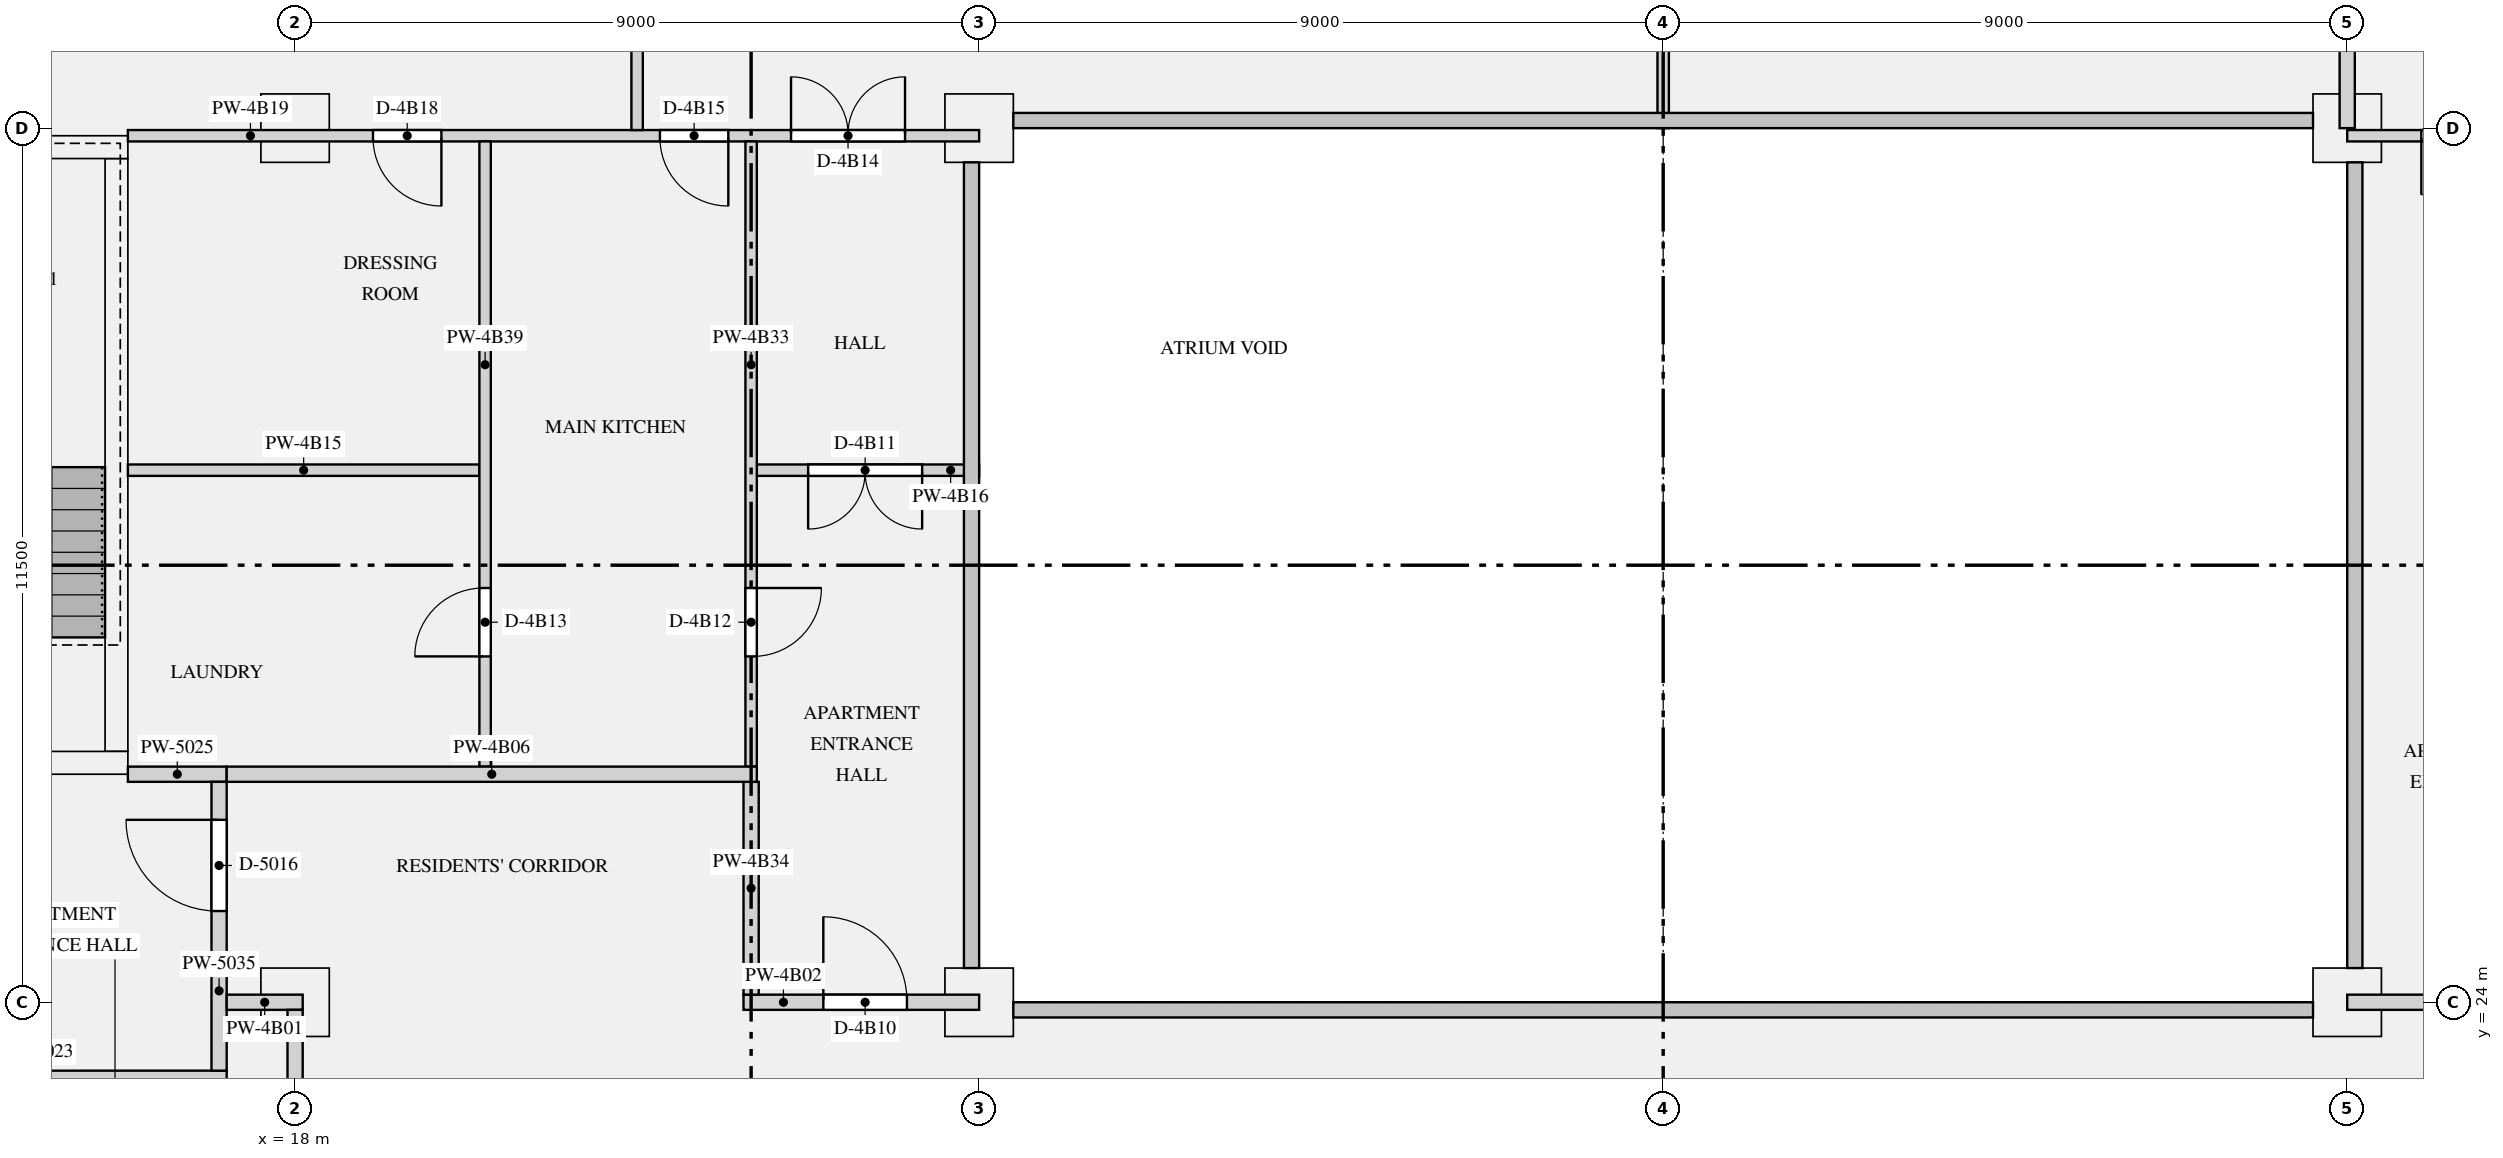
"""IFC4 building model, lengths in metres.
Left out: names, types, materials, properties, quantities, classifications, styles, units other than length and angle.
Written with IfcOpenShell. Run it as: python <this file> out.ifc"""

import sys

from ifc_helpers import new_model, si_unit, direction, frame, frame_2d, origin, origin_2d, place, context, subcontext, project, spatial, rectangle, extrude, element, fill, save


model = new_model("IFC4")
c1 = context("Model", 3, precision=1e-05, world=origin(), true_north=direction((0.0, 1.0)))
c2 = subcontext(c1, "Body", "Model", "MODEL_VIEW")
j1 = project(units=[si_unit("LENGTHUNIT", "METRE"), si_unit("PLANEANGLEUNIT", "RADIAN")], contexts=[c1])
p1 = place(None, origin())
s1 = spatial("IfcSite", under=j1, at=p1, CompositionType="ELEMENT")
p2 = place(p1, origin())
s2 = spatial("IfcBuilding", under=s1, at=p2, CompositionType="ELEMENT")
p3 = place(p2, frame((0.0, 0.0, 207.45)))
s3 = spatial("IfcBuildingStorey", under=s2, at=p3, CompositionType="ELEMENT", Elevation=207.45)
for number, where, z_axis, x_axis in (
    (1, (18.0, 24.0, 0.0), (0.0, 0.0, 1.0), (1.0, 0.0, 0.0)),
    (2, (27.0, 24.0, 0.0), (0.0, 0.0, 1.0), (1.0, 0.0, 0.0)),
    (3, (45.0, 24.0, 0.0), (0.0, 0.0, 1.0), (1.0, 0.0, 0.0)),
    (4, (18.0, 35.5, 0.0), (0.0, 0.0, 1.0), (1.0, 0.0, 0.0)),
    (5, (27.0, 35.5, 0.0), (0.0, 0.0, 1.0), (1.0, 0.0, 0.0)),
    (6, (45.0, 35.5, 0.0), (0.0, 0.0, 1.0), (1.0, 0.0, 0.0)),
):
    element("IfcColumn", number, at=place(p3, frame(where, z_axis=z_axis, x_axis=x_axis)), inside=s3, PredefinedType="COLUMN", context=c2, shape_type="SweptSolid", body=[
        extrude(rectangle(XDim=0.9, YDim=0.9, at=origin_2d()), origin(), (0.0, 0.0, 1.0), 3.15),
    ])
p4 = place(p3, frame((12.2, 27.15, 0.0), z_axis=(0.0, 0.0, 1.0), x_axis=(1.0, 0.0, 0.0)))
e7 = element("IfcWall", 7, at=p4, inside=s3, PredefinedType="SHEAR", context=c2, shape_type="SweptSolid", body=[
    extrude(rectangle(XDim=3.6, YDim=0.3, at=frame_2d((1.8, 0.0))), origin(), (0.0, 0.0, 1.0), 3.15),
])
p5 = place(p4, frame((1.25, 0.0, 0.0)))
e8 = element("IfcOpeningElement", 8, at=p5, cuts=e7, PredefinedType="OPENING", context=c2, shape_type="SweptSolid", body=[
    extrude(rectangle(XDim=1.1, YDim=2.1, at=frame_2d((0.55, 1.05))), frame((0.0, 0.16, 0.0), z_axis=(0.0, -1.0, 0.0), x_axis=(1.0, 0.0, 0.0)), (0.0, 0.0, 1.0), 0.32),
])
p6 = place(p3, frame((12.2, 35.25, 0.0), z_axis=(0.0, 0.0, 1.0), x_axis=(1.0, 0.0, 0.0)))
e9 = element("IfcWall", 9, at=p6, inside=s3, PredefinedType="SHEAR", context=c2, shape_type="SweptSolid", body=[
    extrude(rectangle(XDim=3.6, YDim=0.3, at=frame_2d((1.8, 0.0))), origin(), (0.0, 0.0, 1.0), 3.15),
])
p7 = place(p3, frame((15.65, 27.3, 0.0), z_axis=(0.0, 0.0, 1.0), x_axis=(0.0, 1.0, 0.0)))
e10 = element("IfcWall", 10, at=p7, inside=s3, PredefinedType="SHEAR", context=c2, shape_type="SweptSolid", body=[
    extrude(rectangle(XDim=7.8, YDim=0.3, at=frame_2d((3.9, 0.0))), origin(), (0.0, 0.0, 1.0), 3.15),
])
p8 = place(p3, frame((12.1, 23.0, 0.0), z_axis=(0.0, 0.0, 1.0), x_axis=(1.0, 0.0, 0.0)))
e11 = element("IfcWall", 11, at=p8, inside=s3, PredefinedType="PARTITIONING", context=c2, shape_type="SweptSolid", body=[
    extrude(rectangle(XDim=5.0, YDim=0.2, at=frame_2d((2.5, 0.0))), origin(), (0.0, 0.0, 1.0), 2.83),
])
p9 = place(p3, frame((15.8, 27.0, 0.0), z_axis=(0.0, 0.0, 1.0), x_axis=(1.0, 0.0, 0.0)))
e12 = element("IfcWall", 12, at=p9, inside=s3, PredefinedType="PARTITIONING", context=c2, shape_type="SweptSolid", body=[
    extrude(rectangle(XDim=1.3, YDim=0.2, at=frame_2d((0.65, 0.0))), origin(), (0.0, 0.0, 1.0), 2.83),
])
p10 = place(p3, frame((17.0, 23.1, 0.0), z_axis=(0.0, 0.0, 1.0), x_axis=(0.0, 1.0, 0.0)))
e13 = element("IfcWall", 13, at=p10, inside=s3, PredefinedType="PARTITIONING", context=c2, shape_type="SweptSolid", body=[
    extrude(rectangle(XDim=3.8, YDim=0.2, at=frame_2d((1.9, 0.0))), origin(), (0.0, 0.0, 1.0), 2.83),
])
p11 = place(p10, frame((2.1, 0.0, 0.0)))
e14 = element("IfcOpeningElement", 14, at=p11, cuts=e13, PredefinedType="OPENING", context=c2, shape_type="SweptSolid", body=[
    extrude(rectangle(XDim=1.2, YDim=2.1, at=frame_2d((0.6, 1.05))), frame((0.0, 0.11, 0.0), z_axis=(0.0, -1.0, 0.0), x_axis=(1.0, 0.0, 0.0)), (0.0, 0.0, 1.0), 0.22),
])
p12 = place(p3, frame((17.1, 24.0, 0.0), z_axis=(0.0, 0.0, 1.0), x_axis=(1.0, 0.0, 0.0)))
e15 = element("IfcWall", 15, at=p12, inside=s3, PredefinedType="PARTITIONING", context=c2, shape_type="SweptSolid", body=[
    extrude(rectangle(XDim=1.0, YDim=0.2, at=frame_2d((0.5, 0.0))), origin(), (0.0, 0.0, 1.0), 2.83),
])
p13 = place(p3, frame((23.9, 24.0, 0.0), z_axis=(0.0, 0.0, 1.0), x_axis=(1.0, 0.0, 0.0)))
e16 = element("IfcWall", 16, at=p13, inside=s3, PredefinedType="PARTITIONING", context=c2, shape_type="SweptSolid", body=[
    extrude(rectangle(XDim=3.1, YDim=0.2, at=frame_2d((1.55, 0.0))), origin(), (0.0, 0.0, 1.0), 2.83),
])
p14 = place(p13, frame((1.05, 0.0, 0.0)))
e17 = element("IfcOpeningElement", 17, at=p14, cuts=e16, PredefinedType="OPENING", context=c2, shape_type="SweptSolid", body=[
    extrude(rectangle(XDim=1.1, YDim=2.1, at=frame_2d((0.55, 1.05))), frame((0.0, 0.11, 0.0), z_axis=(0.0, -1.0, 0.0), x_axis=(1.0, 0.0, 0.0)), (0.0, 0.0, 1.0), 0.22),
])
p15 = place(p3, frame((45.0, 24.0, 0.0), z_axis=(0.0, 0.0, 1.0), x_axis=(1.0, 0.0, 0.0)))
e18 = element("IfcWall", 18, at=p15, inside=s3, PredefinedType="PARTITIONING", context=c2, shape_type="SweptSolid", body=[
    extrude(rectangle(XDim=3.1, YDim=0.2, at=frame_2d((1.55, 0.0))), origin(), (0.0, 0.0, 1.0), 2.83),
])
p16 = place(p3, frame((17.1, 27.0, 0.0), z_axis=(0.0, 0.0, 1.0), x_axis=(1.0, 0.0, 0.0)))
e19 = element("IfcWall", 19, at=p16, inside=s3, PredefinedType="PARTITIONING", context=c2, shape_type="SweptSolid", body=[
    extrude(rectangle(XDim=6.975, YDim=0.2, at=frame_2d((3.487, 0.0))), origin(), (0.0, 0.0, 1.0), 2.83),
])
p17 = place(p3, frame((15.8, 31.0, 0.0), z_axis=(0.0, 0.0, 1.0), x_axis=(1.0, 0.0, 0.0)))
e20 = element("IfcWall", 20, at=p17, inside=s3, PredefinedType="PARTITIONING", context=c2, shape_type="SweptSolid", body=[
    extrude(rectangle(XDim=4.625, YDim=0.15, at=frame_2d((2.312, 0.0))), origin(), (0.0, 0.0, 1.0), 2.83),
])
p18 = place(p3, frame((24.075, 31.0, 0.0), z_axis=(0.0, 0.0, 1.0), x_axis=(1.0, 0.0, 0.0)))
e21 = element("IfcWall", 21, at=p18, inside=s3, PredefinedType="PARTITIONING", context=c2, shape_type="SweptSolid", body=[
    extrude(rectangle(XDim=2.925, YDim=0.15, at=frame_2d((1.462, 0.0))), origin(), (0.0, 0.0, 1.0), 2.83),
])
p19 = place(p18, frame((0.675, 0.0, 0.0)))
e22 = element("IfcOpeningElement", 22, at=p19, cuts=e21, PredefinedType="OPENING", context=c2, shape_type="SweptSolid", body=[
    extrude(rectangle(XDim=1.5, YDim=2.1, at=frame_2d((0.75, 1.05))), frame((0.0, 0.085, 0.0), z_axis=(0.0, -1.0, 0.0), x_axis=(1.0, 0.0, 0.0)), (0.0, 0.0, 1.0), 0.17),
])
p20 = place(p3, frame((15.8, 35.4, 0.0), z_axis=(0.0, 0.0, 1.0), x_axis=(1.0, 0.0, 0.0)))
e23 = element("IfcWall", 23, at=p20, inside=s3, PredefinedType="PARTITIONING", context=c2, shape_type="SweptSolid", body=[
    extrude(rectangle(XDim=11.2, YDim=0.15, at=frame_2d((5.6, 0.0))), origin(), (0.0, 0.0, 1.0), 2.83),
])
p21 = place(p20, frame((8.725, 0.0, 0.0)))
e24 = element("IfcOpeningElement", 24, at=p21, cuts=e23, PredefinedType="OPENING", context=c2, shape_type="SweptSolid", body=[
    extrude(rectangle(XDim=1.5, YDim=2.1, at=frame_2d((0.75, 1.05))), frame((0.0, 0.085, 0.0), z_axis=(0.0, -1.0, 0.0), x_axis=(1.0, 0.0, 0.0)), (0.0, 0.0, 1.0), 0.17),
])
p22 = place(p20, frame((7.0, 0.0, 0.0)))
e25 = element("IfcOpeningElement", 25, at=p22, cuts=e23, PredefinedType="OPENING", context=c2, shape_type="SweptSolid", body=[
    extrude(rectangle(XDim=0.9, YDim=2.1, at=frame_2d((0.45, 1.05))), frame((0.0, 0.085, 0.0), z_axis=(0.0, -1.0, 0.0), x_axis=(1.0, 0.0, 0.0)), (0.0, 0.0, 1.0), 0.17),
])
p23 = place(p20, frame((3.225, 0.0, 0.0)))
e26 = element("IfcOpeningElement", 26, at=p23, cuts=e23, PredefinedType="OPENING", context=c2, shape_type="SweptSolid", body=[
    extrude(rectangle(XDim=0.9, YDim=2.1, at=frame_2d((0.45, 1.05))), frame((0.0, 0.085, 0.0), z_axis=(0.0, -1.0, 0.0), x_axis=(1.0, 0.0, 0.0)), (0.0, 0.0, 1.0), 0.17),
])
p24 = place(p3, frame((45.0, 35.4, 0.0), z_axis=(0.0, 0.0, 1.0), x_axis=(1.0, 0.0, 0.0)))
e27 = element("IfcWall", 27, at=p24, inside=s3, PredefinedType="PARTITIONING", context=c2, shape_type="SweptSolid", body=[
    extrude(rectangle(XDim=11.2, YDim=0.15, at=frame_2d((5.6, 0.0))), origin(), (0.0, 0.0, 1.0), 2.83),
])
p25 = place(p24, frame((0.975, 0.0, 0.0)))
e28 = element("IfcOpeningElement", 28, at=p25, cuts=e27, PredefinedType="OPENING", context=c2, shape_type="SweptSolid", body=[
    extrude(rectangle(XDim=1.5, YDim=2.1, at=frame_2d((0.75, 1.05))), frame((0.0, 0.085, 0.0), z_axis=(0.0, -1.0, 0.0), x_axis=(1.0, 0.0, 0.0)), (0.0, 0.0, 1.0), 0.17),
])
p26 = place(p24, frame((5.05, 0.0, 0.0)))
e29 = element("IfcOpeningElement", 29, at=p26, cuts=e27, PredefinedType="OPENING", context=c2, shape_type="SweptSolid", body=[
    extrude(rectangle(XDim=0.9, YDim=2.1, at=frame_2d((0.45, 1.05))), frame((0.0, 0.085, 0.0), z_axis=(0.0, -1.0, 0.0), x_axis=(1.0, 0.0, 0.0)), (0.0, 0.0, 1.0), 0.17),
])
p27 = place(p3, frame((18.0, 16.1, 0.0), z_axis=(0.0, 0.0, 1.0), x_axis=(0.0, 1.0, 0.0)))
e30 = element("IfcWall", 30, at=p27, inside=s3, PredefinedType="PARTITIONING", context=c2, shape_type="SweptSolid", body=[
    extrude(rectangle(XDim=7.8, YDim=0.2, at=frame_2d((3.9, 0.0))), origin(), (0.0, 0.0, 1.0), 2.83),
])
p28 = place(p27, frame((5.35, 0.0, 0.0)))
e31 = element("IfcOpeningElement", 31, at=p28, cuts=e30, PredefinedType="OPENING", context=c2, shape_type="SweptSolid", body=[
    extrude(rectangle(XDim=1.1, YDim=2.1, at=frame_2d((0.55, 1.05))), frame((0.0, 0.11, 0.0), z_axis=(0.0, -1.0, 0.0), x_axis=(1.0, 0.0, 0.0)), (0.0, 0.0, 1.0), 0.22),
])
p29 = place(p3, frame((24.0, 27.1, 0.0), z_axis=(0.0, 0.0, 1.0), x_axis=(0.0, 1.0, 0.0)))
e32 = element("IfcWall", 32, at=p29, inside=s3, PredefinedType="PARTITIONING", context=c2, shape_type="SweptSolid", body=[
    extrude(rectangle(XDim=8.225, YDim=0.15, at=frame_2d((4.112, 0.0))), origin(), (0.0, 0.0, 1.0), 2.83),
])
p30 = place(p29, frame((1.45, 0.0, 0.0)))
e33 = element("IfcOpeningElement", 33, at=p30, cuts=e32, PredefinedType="OPENING", context=c2, shape_type="SweptSolid", body=[
    extrude(rectangle(XDim=0.9, YDim=2.1, at=frame_2d((0.45, 1.05))), frame((0.0, 0.085, 0.0), z_axis=(0.0, -1.0, 0.0), x_axis=(1.0, 0.0, 0.0)), (0.0, 0.0, 1.0), 0.17),
])
p31 = place(p3, frame((24.0, 24.1, 0.0), z_axis=(0.0, 0.0, 1.0), x_axis=(0.0, 1.0, 0.0)))
e34 = element("IfcWall", 34, at=p31, inside=s3, PredefinedType="PARTITIONING", context=c2, shape_type="SweptSolid", body=[
    extrude(rectangle(XDim=2.8, YDim=0.2, at=frame_2d((1.4, 0.0))), origin(), (0.0, 0.0, 1.0), 2.83),
])
p32 = place(p3, frame((20.5, 27.1, 0.0), z_axis=(0.0, 0.0, 1.0), x_axis=(0.0, 1.0, 0.0)))
e35 = element("IfcWall", 35, at=p32, inside=s3, PredefinedType="PARTITIONING", context=c2, shape_type="SweptSolid", body=[
    extrude(rectangle(XDim=8.225, YDim=0.15, at=frame_2d((4.112, 0.0))), origin(), (0.0, 0.0, 1.0), 2.83),
])
p33 = place(p32, frame((1.45, 0.0, 0.0)))
e36 = element("IfcOpeningElement", 36, at=p33, cuts=e35, PredefinedType="OPENING", context=c2, shape_type="SweptSolid", body=[
    extrude(rectangle(XDim=0.9, YDim=2.1, at=frame_2d((0.45, 1.05))), frame((0.0, 0.085, 0.0), z_axis=(0.0, -1.0, 0.0), x_axis=(1.0, 0.0, 0.0)), (0.0, 0.0, 1.0), 0.17),
])
p34 = place(p3, frame((22.5, 35.475, 0.0), z_axis=(0.0, 0.0, 1.0), x_axis=(0.0, 1.0, 0.0)))
e37 = element("IfcWall", 37, at=p34, inside=s3, PredefinedType="PARTITIONING", context=c2, shape_type="SweptSolid", body=[
    extrude(rectangle(XDim=5.375, YDim=0.15, at=frame_2d((2.688, 0.0))), origin(), (0.0, 0.0, 1.0), 2.83),
])
p35 = place(p34, frame((2.275, 0.0, 0.0)))
e38 = element("IfcOpeningElement", 38, at=p35, cuts=e37, PredefinedType="OPENING", context=c2, shape_type="SweptSolid", body=[
    extrude(rectangle(XDim=0.9, YDim=2.1, at=frame_2d((0.45, 1.05))), frame((0.0, 0.085, 0.0), z_axis=(0.0, -1.0, 0.0), x_axis=(1.0, 0.0, 0.0)), (0.0, 0.0, 1.0), 0.17),
])
p36 = place(p3, frame((36.0, 35.5, 0.0), z_axis=(0.0, 0.0, 1.0), x_axis=(0.0, 1.0, 0.0)))
e39 = element("IfcWall", 39, at=p36, inside=s3, PredefinedType="PARTITIONING", context=c2, shape_type="SweptSolid", body=[
    extrude(rectangle(XDim=5.35, YDim=0.15, at=frame_2d((2.675, 0.0))), origin(), (0.0, 0.0, 1.0), 2.83),
])
p37 = place(p36, frame((2.25, 0.0, 0.0)))
e40 = element("IfcOpeningElement", 40, at=p37, cuts=e39, PredefinedType="OPENING", context=c2, shape_type="SweptSolid", body=[
    extrude(rectangle(XDim=0.9, YDim=2.1, at=frame_2d((0.45, 1.05))), frame((0.0, 0.085, 0.0), z_axis=(0.0, -1.0, 0.0), x_axis=(1.0, 0.0, 0.0)), (0.0, 0.0, 1.0), 0.17),
])
p38 = place(p3, frame((45.0, 35.5, 0.0), z_axis=(0.0, 0.0, 1.0), x_axis=(0.0, 1.0, 0.0)))
e41 = element("IfcWall", 41, at=p38, inside=s3, PredefinedType="PARTITIONING", context=c2, shape_type="SweptSolid", body=[
    extrude(rectangle(XDim=5.35, YDim=0.2, at=frame_2d((2.675, 0.0))), origin(), (0.0, 0.0, 1.0), 2.83),
])
p39 = place(p11, origin())
e42 = element("IfcDoor", 42, at=p39, inside=s3, OperationType="SINGLE_SWING_RIGHT", PredefinedType="DOOR", context=c2, shape_type="SweptSolid", body=[
    extrude(rectangle(XDim=1.2, YDim=2.1, at=frame_2d((0.6, 1.05))), frame((0.0, 0.025, 0.0), z_axis=(0.0, -1.0, 0.0), x_axis=(1.0, 0.0, 0.0)), (0.0, 0.0, 1.0), 0.05),
])
fill(e14, e42)
p40 = place(p14, origin())
e43 = element("IfcDoor", 43, at=p40, inside=s3, OperationType="SINGLE_SWING_LEFT", PredefinedType="DOOR", context=c2, shape_type="SweptSolid", body=[
    extrude(rectangle(XDim=1.1, YDim=2.1, at=frame_2d((0.55, 1.05))), frame((0.0, 0.025, 0.0), z_axis=(0.0, -1.0, 0.0), x_axis=(1.0, 0.0, 0.0)), (0.0, 0.0, 1.0), 0.05),
])
fill(e17, e43)
p41 = place(p19, frame((1.5, 0.0, 0.0), z_axis=(0.0, 0.0, 1.0), x_axis=(-1.0, 0.0, 0.0)))
e44 = element("IfcDoor", 44, at=p41, inside=s3, OperationType="DOUBLE_DOOR_SINGLE_SWING", PredefinedType="DOOR", context=c2, shape_type="SweptSolid", body=[
    extrude(rectangle(XDim=1.5, YDim=2.1, at=frame_2d((0.75, 1.05))), frame((0.0, 0.025, 0.0), z_axis=(0.0, -1.0, 0.0), x_axis=(1.0, 0.0, 0.0)), (0.0, 0.0, 1.0), 0.05),
])
fill(e22, e44)
p42 = place(p30, frame((0.9, 0.0, 0.0), z_axis=(0.0, 0.0, 1.0), x_axis=(-1.0, 0.0, 0.0)))
e45 = element("IfcDoor", 45, at=p42, inside=s3, OperationType="SINGLE_SWING_LEFT", PredefinedType="DOOR", context=c2, shape_type="SweptSolid", body=[
    extrude(rectangle(XDim=0.9, YDim=2.1, at=frame_2d((0.45, 1.05))), frame((0.0, 0.025, 0.0), z_axis=(0.0, -1.0, 0.0), x_axis=(1.0, 0.0, 0.0)), (0.0, 0.0, 1.0), 0.05),
])
fill(e33, e45)
p43 = place(p33, origin())
e46 = element("IfcDoor", 46, at=p43, inside=s3, OperationType="SINGLE_SWING_LEFT", PredefinedType="DOOR", context=c2, shape_type="SweptSolid", body=[
    extrude(rectangle(XDim=0.9, YDim=2.1, at=frame_2d((0.45, 1.05))), frame((0.0, 0.025, 0.0), z_axis=(0.0, -1.0, 0.0), x_axis=(1.0, 0.0, 0.0)), (0.0, 0.0, 1.0), 0.05),
])
fill(e36, e46)
p44 = place(p21, origin())
e47 = element("IfcDoor", 47, at=p44, inside=s3, OperationType="DOUBLE_DOOR_SINGLE_SWING", PredefinedType="DOOR", context=c2, shape_type="SweptSolid", body=[
    extrude(rectangle(XDim=1.5, YDim=2.1, at=frame_2d((0.75, 1.05))), frame((0.0, 0.025, 0.0), z_axis=(0.0, -1.0, 0.0), x_axis=(1.0, 0.0, 0.0)), (0.0, 0.0, 1.0), 0.05),
])
fill(e24, e47)
p45 = place(p22, frame((0.9, 0.0, 0.0), z_axis=(0.0, 0.0, 1.0), x_axis=(-1.0, 0.0, 0.0)))
e48 = element("IfcDoor", 48, at=p45, inside=s3, OperationType="SINGLE_SWING_LEFT", PredefinedType="DOOR", context=c2, shape_type="SweptSolid", body=[
    extrude(rectangle(XDim=0.9, YDim=2.1, at=frame_2d((0.45, 1.05))), frame((0.0, 0.025, 0.0), z_axis=(0.0, -1.0, 0.0), x_axis=(1.0, 0.0, 0.0)), (0.0, 0.0, 1.0), 0.05),
])
fill(e25, e48)
p46 = place(p23, frame((0.9, 0.0, 0.0), z_axis=(0.0, 0.0, 1.0), x_axis=(-1.0, 0.0, 0.0)))
e49 = element("IfcDoor", 49, at=p46, inside=s3, OperationType="SINGLE_SWING_LEFT", PredefinedType="DOOR", context=c2, shape_type="SweptSolid", body=[
    extrude(rectangle(XDim=0.9, YDim=2.1, at=frame_2d((0.45, 1.05))), frame((0.0, 0.025, 0.0), z_axis=(0.0, -1.0, 0.0), x_axis=(1.0, 0.0, 0.0)), (0.0, 0.0, 1.0), 0.05),
])
fill(e26, e49)
p47 = place(p25, frame((1.5, 0.0, 0.0), z_axis=(0.0, 0.0, 1.0), x_axis=(-1.0, 0.0, 0.0)))
e50 = element("IfcDoor", 50, at=p47, inside=s3, OperationType="DOUBLE_DOOR_SINGLE_SWING", PredefinedType="DOOR", context=c2, shape_type="SweptSolid", body=[
    extrude(rectangle(XDim=1.5, YDim=2.1, at=frame_2d((0.75, 1.05))), frame((0.0, 0.025, 0.0), z_axis=(0.0, -1.0, 0.0), x_axis=(1.0, 0.0, 0.0)), (0.0, 0.0, 1.0), 0.05),
])
fill(e28, e50)
save(model, sys.argv[1])
